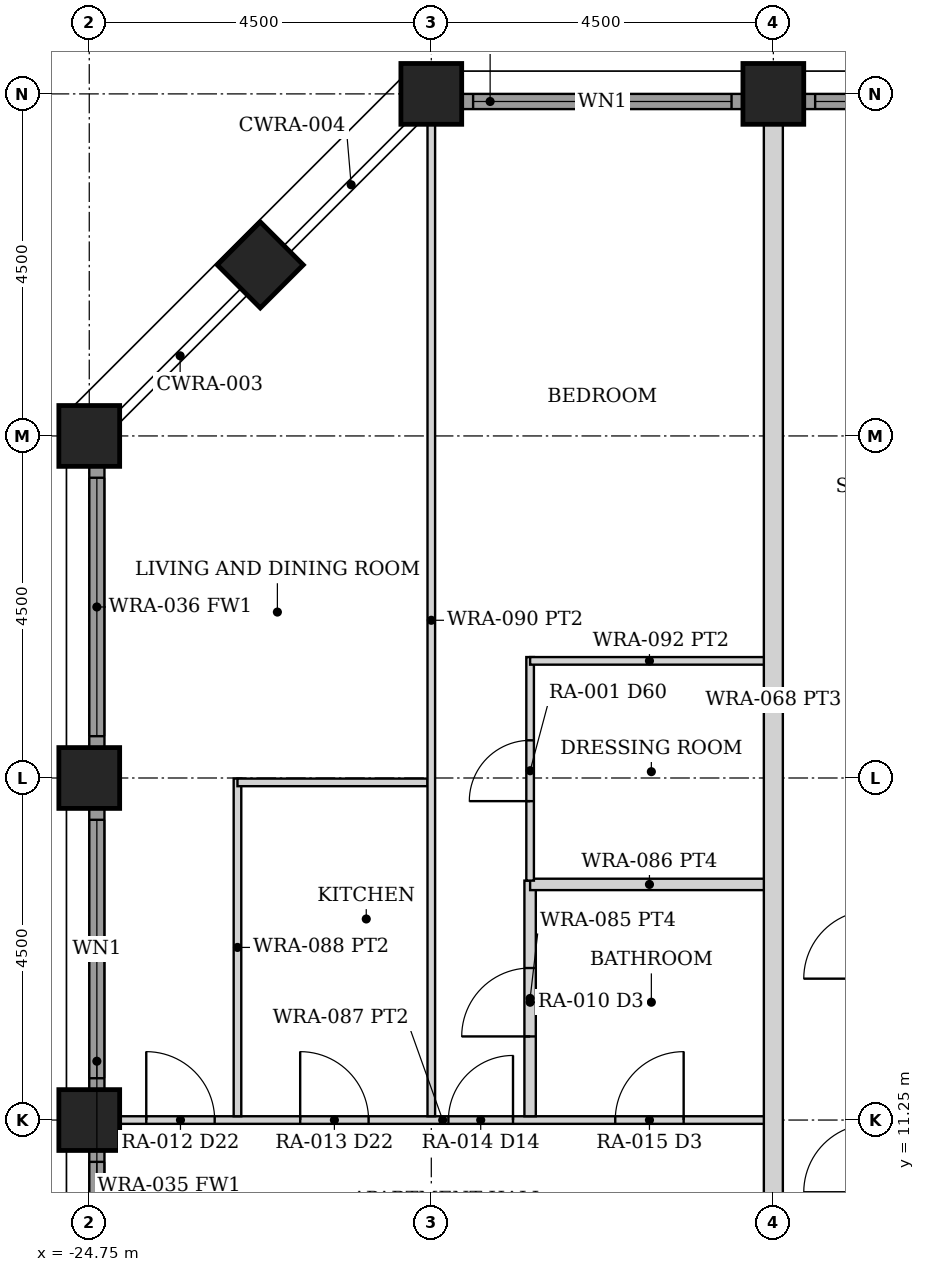
"""IFC4 building model, lengths in metres.
Left out: names, types, materials, properties, quantities, classifications, styles, units other than length and angle.
Written with IfcOpenShell. Run it as: python <this file> out.ifc"""

import sys

from ifc_helpers import new_model, si_unit, direction, frame, frame_2d, origin, origin_2d, place, context, subcontext, project, spatial, rectangle, hollow_rectangle, extrude, element, fill, save


model = new_model("IFC4")
c1 = context("Model", 3, precision=1e-05, world=origin(), true_north=direction((0.0, 1.0)))
c2 = subcontext(c1, "Body", "Model", "MODEL_VIEW")
j1 = project(units=[si_unit("LENGTHUNIT", "METRE"), si_unit("PLANEANGLEUNIT", "RADIAN")], contexts=[c1])
p1 = place(None, origin())
s1 = spatial("IfcSite", under=j1, at=p1, CompositionType="ELEMENT")
p2 = place(p1, origin())
s2 = spatial("IfcBuilding", under=s1, at=p2, CompositionType="ELEMENT")
p3 = place(p2, frame((0.0, 0.0, 30.0)))
s3 = spatial("IfcBuildingStorey", under=s2, at=p3, CompositionType="ELEMENT", Elevation=30.0)
for number, where, z_axis, x_axis in (
    (1, (-20.25, 24.75, 0.0), (0.0, 0.0, 1.0), (0.0, 1.0, 0.0)),
    (2, (-15.75, 24.75, 0.0), (0.0, 0.0, 1.0), (0.0, 1.0, 0.0)),
    (3, (-24.75, 11.25, 0.0), (0.0, 0.0, 1.0), (1.0, 0.0, 0.0)),
    (4, (-24.75, 15.75, 0.0), (0.0, 0.0, 1.0), (1.0, 0.0, 0.0)),
    (5, (-24.75, 20.25, 0.0), (0.0, 0.0, 1.0), (1.0, 0.0, 0.0)),
    (6, (-22.5, 22.5, 0.0), (0.0, 0.0, 1.0), (0.707, -0.707, 0.0)),
):
    element("IfcColumn", number, at=place(p3, frame(where, z_axis=z_axis, x_axis=x_axis)), inside=s3, PredefinedType="COLUMN", context=c2, shape_type="SweptSolid", body=[
        extrude(hollow_rectangle(XDim=0.8, YDim=0.8, WallThickness=0.08, at=origin_2d()), origin(), (0.0, 0.0, 1.0), 3.5),
    ])
p4 = place(p3, frame((-19.845, 24.65, 0.0), z_axis=(0.0, 0.0, 1.0), x_axis=(1.0, 0.0, 0.0)))
e7 = element("IfcWall", 7, at=p4, inside=s3, PredefinedType="SOLIDWALL", context=c2, shape_type="SweptSolid", body=[
    extrude(rectangle(XDim=3.69, YDim=0.2, at=frame_2d((1.845, 0.0))), origin(), (0.0, 0.0, 1.0), 2.379),
])
p5 = place(p4, frame((0.145, 0.0, 0.3)))
e8 = element("IfcOpeningElement", 8, at=p5, cuts=e7, PredefinedType="OPENING", context=c2, shape_type="SweptSolid", body=[
    extrude(rectangle(XDim=3.4, YDim=1.929, at=frame_2d((1.7, 0.964))), frame((0.0, 0.11, 0.0), z_axis=(0.0, -1.0, 0.0), x_axis=(1.0, 0.0, 0.0)), (0.0, 0.0, 1.0), 0.22),
])
p6 = place(p3, frame((-15.345, 24.65, 0.0), z_axis=(0.0, 0.0, 1.0), x_axis=(1.0, 0.0, 0.0)))
e9 = element("IfcWall", 9, at=p6, inside=s3, PredefinedType="SOLIDWALL", context=c2, shape_type="SweptSolid", body=[
    extrude(rectangle(XDim=3.69, YDim=0.2, at=frame_2d((1.845, 0.0))), origin(), (0.0, 0.0, 1.0), 2.379),
])
p7 = place(p6, frame((0.145, 0.0, 0.3)))
e10 = element("IfcOpeningElement", 10, at=p7, cuts=e9, PredefinedType="OPENING", context=c2, shape_type="SweptSolid", body=[
    extrude(rectangle(XDim=3.4, YDim=1.929, at=frame_2d((1.7, 0.964))), frame((0.0, 0.11, 0.0), z_axis=(0.0, -1.0, 0.0), x_axis=(1.0, 0.0, 0.0)), (0.0, 0.0, 1.0), 0.22),
])
p8 = place(p3, frame((-24.65, 7.155, 0.0), z_axis=(0.0, 0.0, 1.0), x_axis=(0.0, 1.0, 0.0)))
e11 = element("IfcWall", 11, at=p8, inside=s3, PredefinedType="SOLIDWALL", context=c2, shape_type="SweptSolid", body=[
    extrude(rectangle(XDim=3.69, YDim=0.2, at=frame_2d((1.845, 0.0))), origin(), (0.0, 0.0, 1.0), 2.379),
])
p9 = place(p8, frame((0.145, 0.0, 0.3)))
e12 = element("IfcOpeningElement", 12, at=p9, cuts=e11, PredefinedType="OPENING", context=c2, shape_type="SweptSolid", body=[
    extrude(rectangle(XDim=3.4, YDim=1.929, at=frame_2d((1.7, 0.964))), frame((0.0, 0.11, 0.0), z_axis=(0.0, -1.0, 0.0), x_axis=(1.0, 0.0, 0.0)), (0.0, 0.0, 1.0), 0.22),
])
p10 = place(p3, frame((-24.65, 11.655, 0.0), z_axis=(0.0, 0.0, 1.0), x_axis=(0.0, 1.0, 0.0)))
e13 = element("IfcWall", 13, at=p10, inside=s3, PredefinedType="SOLIDWALL", context=c2, shape_type="SweptSolid", body=[
    extrude(rectangle(XDim=3.69, YDim=0.2, at=frame_2d((1.845, 0.0))), origin(), (0.0, 0.0, 1.0), 2.379),
])
p11 = place(p10, frame((0.145, 0.0, 0.3)))
e14 = element("IfcOpeningElement", 14, at=p11, cuts=e13, PredefinedType="OPENING", context=c2, shape_type="SweptSolid", body=[
    extrude(rectangle(XDim=3.4, YDim=1.929, at=frame_2d((1.7, 0.964))), frame((0.0, 0.11, 0.0), z_axis=(0.0, -1.0, 0.0), x_axis=(1.0, 0.0, 0.0)), (0.0, 0.0, 1.0), 0.22),
])
p12 = place(p3, frame((-24.65, 16.155, 0.0), z_axis=(0.0, 0.0, 1.0), x_axis=(0.0, 1.0, 0.0)))
e15 = element("IfcWall", 15, at=p12, inside=s3, PredefinedType="SOLIDWALL", context=c2, shape_type="SweptSolid", body=[
    extrude(rectangle(XDim=3.69, YDim=0.2, at=frame_2d((1.845, 0.0))), origin(), (0.0, 0.0, 1.0), 2.379),
])
p13 = place(p12, frame((0.145, 0.0, 0.3)))
e16 = element("IfcOpeningElement", 16, at=p13, cuts=e15, PredefinedType="OPENING", context=c2, shape_type="SweptSolid", body=[
    extrude(rectangle(XDim=3.4, YDim=1.929, at=frame_2d((1.7, 0.964))), frame((0.0, 0.11, 0.0), z_axis=(0.0, -1.0, 0.0), x_axis=(1.0, 0.0, 0.0)), (0.0, 0.0, 1.0), 0.22),
])
p14 = place(p3, frame((-24.35, 11.25, 0.0), z_axis=(0.0, 0.0, 1.0), x_axis=(1.0, 0.0, 0.0)))
e17 = element("IfcWall", 17, at=p14, inside=s3, PredefinedType="PARTITIONING", context=c2, shape_type="SweptSolid", body=[
    extrude(rectangle(XDim=8.5, YDim=0.1, at=frame_2d((4.25, 0.0))), origin(), (0.0, 0.0, 1.0), 2.373),
])
p15 = place(p14, frame((2.375, 0.0, 0.0)))
e18 = element("IfcOpeningElement", 18, at=p15, cuts=e17, PredefinedType="OPENING", context=c2, shape_type="SweptSolid", body=[
    extrude(rectangle(XDim=0.9, YDim=2.1, at=frame_2d((0.45, 1.05))), frame((0.0, 0.06, 0.0), z_axis=(0.0, -1.0, 0.0), x_axis=(1.0, 0.0, 0.0)), (0.0, 0.0, 1.0), 0.12),
])
p16 = place(p14, frame((0.35, 0.0, 0.0)))
e19 = element("IfcOpeningElement", 19, at=p16, cuts=e17, PredefinedType="OPENING", context=c2, shape_type="SweptSolid", body=[
    extrude(rectangle(XDim=0.9, YDim=2.1, at=frame_2d((0.45, 1.05))), frame((0.0, 0.06, 0.0), z_axis=(0.0, -1.0, 0.0), x_axis=(1.0, 0.0, 0.0)), (0.0, 0.0, 1.0), 0.12),
])
p17 = place(p14, frame((4.325, 0.0, 0.0)))
e20 = element("IfcOpeningElement", 20, at=p17, cuts=e17, PredefinedType="OPENING", context=c2, shape_type="SweptSolid", body=[
    extrude(rectangle(XDim=0.85, YDim=2.1, at=frame_2d((0.425, 1.05))), frame((0.0, 0.06, 0.0), z_axis=(0.0, -1.0, 0.0), x_axis=(1.0, 0.0, 0.0)), (0.0, 0.0, 1.0), 0.12),
])
p18 = place(p14, frame((6.52, 0.0, 0.0)))
e21 = element("IfcOpeningElement", 21, at=p18, cuts=e17, PredefinedType="OPENING", context=c2, shape_type="SweptSolid", body=[
    extrude(rectangle(XDim=0.9, YDim=2.1, at=frame_2d((0.45, 1.05))), frame((0.0, 0.06, 0.0), z_axis=(0.0, -1.0, 0.0), x_axis=(1.0, 0.0, 0.0)), (0.0, 0.0, 1.0), 0.12),
])
p19 = place(p3, frame((-22.8, 11.3, 0.0), z_axis=(0.0, 0.0, 1.0), x_axis=(0.0, 1.0, 0.0)))
e22 = element("IfcWall", 22, at=p19, inside=s3, PredefinedType="PARTITIONING", context=c2, shape_type="SweptSolid", body=[
    extrude(rectangle(XDim=4.442, YDim=0.1, at=frame_2d((2.221, 0.0))), origin(), (0.0, 0.0, 1.0), 2.373),
])
p20 = place(p3, frame((-22.8, 15.692, 0.0), z_axis=(0.0, 0.0, 1.0), x_axis=(1.0, 0.0, 0.0)))
e23 = element("IfcWall", 23, at=p20, inside=s3, PredefinedType="PARTITIONING", context=c2, shape_type="SweptSolid", body=[
    extrude(rectangle(XDim=2.5, YDim=0.1, at=frame_2d((1.25, 0.0))), origin(), (0.0, 0.0, 1.0), 2.373),
])
p21 = place(p3, frame((-20.25, 11.3, 0.0), z_axis=(0.0, 0.0, 1.0), x_axis=(0.0, 1.0, 0.0)))
e24 = element("IfcWall", 24, at=p21, inside=s3, PredefinedType="PARTITIONING", context=c2, shape_type="SweptSolid", body=[
    extrude(rectangle(XDim=13.05, YDim=0.1, at=frame_2d((6.525, 0.0))), origin(), (0.0, 0.0, 1.0), 2.373),
])
p22 = place(p3, frame((-18.95, 11.3, 0.0), z_axis=(0.0, 0.0, 1.0), x_axis=(0.0, 1.0, 0.0)))
e25 = element("IfcWall", 25, at=p22, inside=s3, PredefinedType="PARTITIONING", context=c2, shape_type="SweptSolid", body=[
    extrude(rectangle(XDim=3.1, YDim=0.15, at=frame_2d((1.55, 0.0))), origin(), (0.0, 0.0, 1.0), 2.373),
])
p23 = place(p22, frame((1.05, 0.0, 0.0)))
e26 = element("IfcOpeningElement", 26, at=p23, cuts=e25, PredefinedType="OPENING", context=c2, shape_type="SweptSolid", body=[
    extrude(rectangle(XDim=0.9, YDim=2.1, at=frame_2d((0.45, 1.05))), frame((0.0, 0.085, 0.0), z_axis=(0.0, -1.0, 0.0), x_axis=(1.0, 0.0, 0.0)), (0.0, 0.0, 1.0), 0.17),
])
p24 = place(p3, frame((-18.95, 14.35, 0.0), z_axis=(0.0, 0.0, 1.0), x_axis=(1.0, 0.0, 0.0)))
e27 = element("IfcWall", 27, at=p24, inside=s3, PredefinedType="PARTITIONING", context=c2, shape_type="SweptSolid", body=[
    extrude(rectangle(XDim=3.14, YDim=0.15, at=frame_2d((1.57, 0.0))), origin(), (0.0, 0.0, 1.0), 2.373),
])
p25 = place(p3, frame((-18.95, 14.4, 0.0), z_axis=(0.0, 0.0, 1.0), x_axis=(0.0, 1.0, 0.0)))
e28 = element("IfcWall", 28, at=p25, inside=s3, PredefinedType="PARTITIONING", context=c2, shape_type="SweptSolid", body=[
    extrude(rectangle(XDim=2.941, YDim=0.1, at=frame_2d((1.47, 0.0))), origin(), (0.0, 0.0, 1.0), 2.373),
])
p26 = place(p25, frame((1.045, 0.0, 0.0)))
e29 = element("IfcOpeningElement", 29, at=p26, cuts=e28, PredefinedType="OPENING", context=c2, shape_type="SweptSolid", body=[
    extrude(rectangle(XDim=0.8, YDim=2.1, at=frame_2d((0.4, 1.05))), frame((0.0, 0.06, 0.0), z_axis=(0.0, -1.0, 0.0), x_axis=(1.0, 0.0, 0.0)), (0.0, 0.0, 1.0), 0.12),
])
p27 = place(p3, frame((-18.95, 17.291, 0.0), z_axis=(0.0, 0.0, 1.0), x_axis=(1.0, 0.0, 0.0)))
e30 = element("IfcWall", 30, at=p27, inside=s3, PredefinedType="PARTITIONING", context=c2, shape_type="SweptSolid", body=[
    extrude(rectangle(XDim=3.14, YDim=0.1, at=frame_2d((1.57, 0.0))), origin(), (0.0, 0.0, 1.0), 2.373),
])
p28 = place(p3, frame((-15.75, 9.2, 0.0), z_axis=(0.0, 0.0, 1.0), x_axis=(0.0, 1.0, 0.0)))
e31 = element("IfcWall", 31, at=p28, inside=s3, PredefinedType="PARTITIONING", context=c2, shape_type="SweptSolid", body=[
    extrude(rectangle(XDim=15.15, YDim=0.25, at=frame_2d((7.575, 0.0))), origin(), (0.0, 0.0, 1.0), 2.373),
])
p29 = place(p5, origin())
e32 = element("IfcWindow", 32, at=p29, inside=s3, PartitioningType="SINGLE_PANEL", PredefinedType="WINDOW", context=c2, shape_type="SweptSolid", body=[
    extrude(rectangle(XDim=3.4, YDim=1.929, at=frame_2d((1.7, 0.964))), frame((0.0, 0.03, 0.0), z_axis=(0.0, -1.0, 0.0), x_axis=(1.0, 0.0, 0.0)), (0.0, 0.0, 1.0), 0.06),
])
fill(e8, e32)
p30 = place(p7, origin())
e33 = element("IfcWindow", 33, at=p30, inside=s3, PartitioningType="SINGLE_PANEL", PredefinedType="WINDOW", context=c2, shape_type="SweptSolid", body=[
    extrude(rectangle(XDim=3.4, YDim=1.929, at=frame_2d((1.7, 0.964))), frame((0.0, 0.03, 0.0), z_axis=(0.0, -1.0, 0.0), x_axis=(1.0, 0.0, 0.0)), (0.0, 0.0, 1.0), 0.06),
])
fill(e10, e33)
p31 = place(p9, origin())
e34 = element("IfcWindow", 34, at=p31, inside=s3, PartitioningType="SINGLE_PANEL", PredefinedType="WINDOW", context=c2, shape_type="SweptSolid", body=[
    extrude(rectangle(XDim=3.4, YDim=1.929, at=frame_2d((1.7, 0.964))), frame((0.0, 0.03, 0.0), z_axis=(0.0, -1.0, 0.0), x_axis=(1.0, 0.0, 0.0)), (0.0, 0.0, 1.0), 0.06),
])
fill(e12, e34)
p32 = place(p11, origin())
e35 = element("IfcWindow", 35, at=p32, inside=s3, PartitioningType="SINGLE_PANEL", PredefinedType="WINDOW", context=c2, shape_type="SweptSolid", body=[
    extrude(rectangle(XDim=3.4, YDim=1.929, at=frame_2d((1.7, 0.964))), frame((0.0, 0.03, 0.0), z_axis=(0.0, -1.0, 0.0), x_axis=(1.0, 0.0, 0.0)), (0.0, 0.0, 1.0), 0.06),
])
fill(e14, e35)
p33 = place(p13, origin())
e36 = element("IfcWindow", 36, at=p33, inside=s3, PartitioningType="SINGLE_PANEL", PredefinedType="WINDOW", context=c2, shape_type="SweptSolid", body=[
    extrude(rectangle(XDim=3.4, YDim=1.929, at=frame_2d((1.7, 0.964))), frame((0.0, 0.03, 0.0), z_axis=(0.0, -1.0, 0.0), x_axis=(1.0, 0.0, 0.0)), (0.0, 0.0, 1.0), 0.06),
])
fill(e16, e36)
p34 = place(p15, origin())
e37 = element("IfcDoor", 37, at=p34, inside=s3, OperationType="SINGLE_SWING_LEFT", PredefinedType="DOOR", context=c2, shape_type="SweptSolid", body=[
    extrude(rectangle(XDim=0.9, YDim=2.1, at=frame_2d((0.45, 1.05))), frame((0.0, 0.025, 0.0), z_axis=(0.0, -1.0, 0.0), x_axis=(1.0, 0.0, 0.0)), (0.0, 0.0, 1.0), 0.05),
])
fill(e18, e37)
p35 = place(p16, origin())
e38 = element("IfcDoor", 38, at=p35, inside=s3, OperationType="SINGLE_SWING_LEFT", PredefinedType="DOOR", context=c2, shape_type="SweptSolid", body=[
    extrude(rectangle(XDim=0.9, YDim=2.1, at=frame_2d((0.45, 1.05))), frame((0.0, 0.025, 0.0), z_axis=(0.0, -1.0, 0.0), x_axis=(1.0, 0.0, 0.0)), (0.0, 0.0, 1.0), 0.05),
])
fill(e19, e38)
p36 = place(p17, origin())
e39 = element("IfcDoor", 39, at=p36, inside=s3, OperationType="SINGLE_SWING_RIGHT", PredefinedType="DOOR", context=c2, shape_type="SweptSolid", body=[
    extrude(rectangle(XDim=0.85, YDim=2.1, at=frame_2d((0.425, 1.05))), frame((0.0, 0.025, 0.0), z_axis=(0.0, -1.0, 0.0), x_axis=(1.0, 0.0, 0.0)), (0.0, 0.0, 1.0), 0.05),
])
fill(e20, e39)
p37 = place(p23, origin())
e40 = element("IfcDoor", 40, at=p37, inside=s3, OperationType="SINGLE_SWING_LEFT", PredefinedType="DOOR", context=c2, shape_type="SweptSolid", body=[
    extrude(rectangle(XDim=0.9, YDim=2.1, at=frame_2d((0.45, 1.05))), frame((0.0, 0.025, 0.0), z_axis=(0.0, -1.0, 0.0), x_axis=(1.0, 0.0, 0.0)), (0.0, 0.0, 1.0), 0.05),
])
fill(e26, e40)
p38 = place(p18, origin())
e41 = element("IfcDoor", 41, at=p38, inside=s3, OperationType="SINGLE_SWING_RIGHT", PredefinedType="DOOR", context=c2, shape_type="SweptSolid", body=[
    extrude(rectangle(XDim=0.9, YDim=2.1, at=frame_2d((0.45, 1.05))), frame((0.0, 0.025, 0.0), z_axis=(0.0, -1.0, 0.0), x_axis=(1.0, 0.0, 0.0)), (0.0, 0.0, 1.0), 0.05),
])
fill(e21, e41)
p39 = place(p26, origin())
e42 = element("IfcDoor", 42, at=p39, inside=s3, OperationType="SINGLE_SWING_LEFT", PredefinedType="DOOR", context=c2, shape_type="SweptSolid", body=[
    extrude(rectangle(XDim=0.8, YDim=2.1, at=frame_2d((0.4, 1.05))), frame((0.0, 0.025, 0.0), z_axis=(0.0, -1.0, 0.0), x_axis=(1.0, 0.0, 0.0)), (0.0, 0.0, 1.0), 0.05),
])
fill(e29, e42)
save(model, sys.argv[1])
